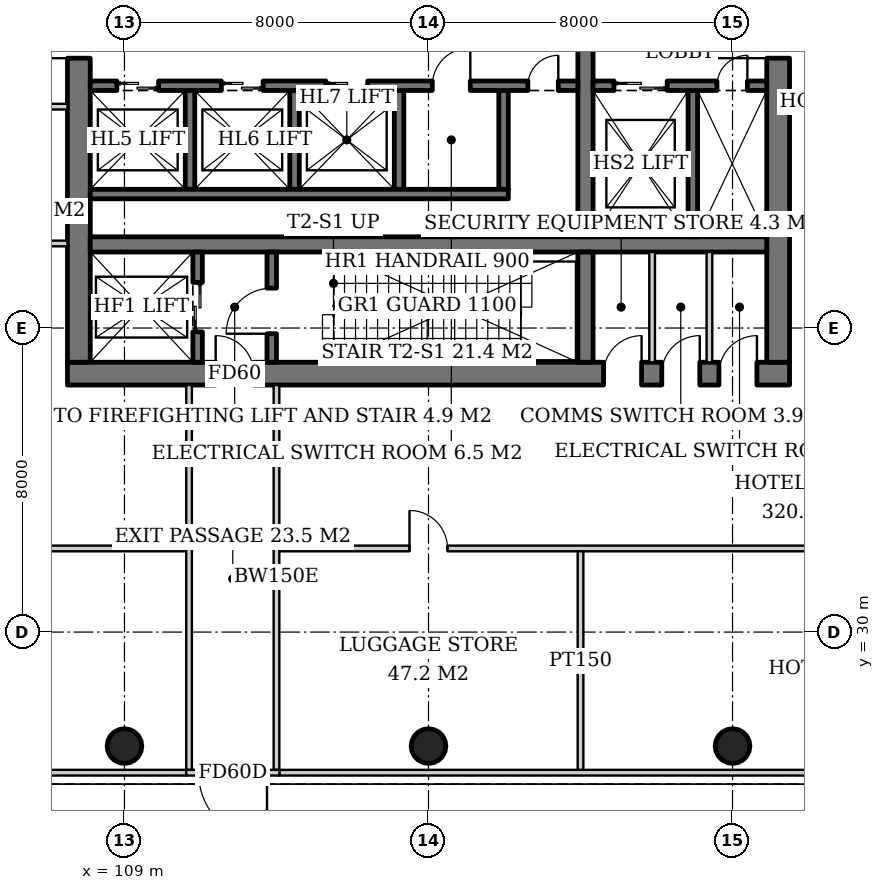
"""IFC4 building model, lengths in metres.
Left out: names, types, materials, properties, quantities, classifications, styles, units other than length and angle.
Written with IfcOpenShell. Run it as: python <this file> out.ifc"""

import sys

from ifc_helpers import new_model, si_unit, direction, frame, frame_2d, origin, origin_2d, place, context, subcontext, project, spatial, rectangle, hollow_circle, extrude, element, fill, save


model = new_model("IFC4")
c1 = context("Model", 3, precision=1e-05, world=origin(), true_north=direction((0.0, 1.0)))
c2 = subcontext(c1, "Body", "Model", "MODEL_VIEW")
j1 = project(units=[si_unit("LENGTHUNIT", "METRE"), si_unit("PLANEANGLEUNIT", "RADIAN")], contexts=[c1])
p1 = place(None, origin())
s1 = spatial("IfcSite", under=j1, at=p1, CompositionType="ELEMENT")
p2 = place(p1, origin())
s2 = spatial("IfcBuilding", under=s1, at=p2, CompositionType="ELEMENT")
p3 = place(p2, origin())
s3 = spatial("IfcBuildingStorey", under=s2, at=p3, CompositionType="ELEMENT", Elevation=0.0)
for number, where, z_axis, x_axis in (
    (1, (109.0, 27.0, 0.0), (0.0, 0.0, 1.0), (1.0, 0.0, 0.0)),
    (2, (117.0, 27.0, 0.0), (0.0, 0.0, 1.0), (1.0, 0.0, 0.0)),
    (3, (125.0, 27.0, 0.0), (0.0, 0.0, 1.0), (1.0, 0.0, 0.0)),
):
    element("IfcColumn", number, at=place(p3, frame(where, z_axis=z_axis, x_axis=x_axis)), inside=s3, PredefinedType="COLUMN", context=c2, shape_type="SweptSolid", body=[
        extrude(hollow_circle(Radius=0.457, WallThickness=0.03, at=origin_2d()), origin(), (0.0, 0.0, 1.0), 6.0),
    ])
p4 = place(p3, frame((107.5, 36.8, 0.0), z_axis=(0.0, 0.0, 1.0), x_axis=(1.0, 0.0, 0.0)))
e4 = element("IfcWall", 4, at=p4, inside=s3, PredefinedType="SHEAR", context=c2, shape_type="SweptSolid", body=[
    extrude(rectangle(XDim=19.0, YDim=0.6, at=frame_2d((9.5, 0.0))), origin(), (0.0, 0.0, 1.0), 6.0),
])
p5 = place(p4, frame((3.9, 0.0, 0.0)))
e5 = element("IfcOpeningElement", 5, at=p5, cuts=e4, PredefinedType="OPENING", context=c2, shape_type="SweptSolid", body=[
    extrude(rectangle(XDim=1.0, YDim=2.1, at=frame_2d((0.5, 1.05))), frame((0.0, 0.31, 0.0), z_axis=(0.0, -1.0, 0.0), x_axis=(1.0, 0.0, 0.0)), (0.0, 0.0, 1.0), 0.62),
])
p6 = place(p4, frame((14.107, 0.0, 0.0)))
e6 = element("IfcOpeningElement", 6, at=p6, cuts=e4, PredefinedType="OPENING", context=c2, shape_type="SweptSolid", body=[
    extrude(rectangle(XDim=1.0, YDim=2.1, at=frame_2d((0.5, 1.05))), frame((0.0, 0.31, 0.0), z_axis=(0.0, -1.0, 0.0), x_axis=(1.0, 0.0, 0.0)), (0.0, 0.0, 1.0), 0.62),
])
p7 = place(p4, frame((15.638, 0.0, 0.0)))
e7 = element("IfcOpeningElement", 7, at=p7, cuts=e4, PredefinedType="OPENING", context=c2, shape_type="SweptSolid", body=[
    extrude(rectangle(XDim=1.0, YDim=2.1, at=frame_2d((0.5, 1.05))), frame((0.0, 0.31, 0.0), z_axis=(0.0, -1.0, 0.0), x_axis=(1.0, 0.0, 0.0)), (0.0, 0.0, 1.0), 0.62),
])
p8 = place(p4, frame((17.142, 0.0, 0.0)))
e8 = element("IfcOpeningElement", 8, at=p8, cuts=e4, PredefinedType="OPENING", context=c2, shape_type="SweptSolid", body=[
    extrude(rectangle(XDim=1.0, YDim=2.1, at=frame_2d((0.5, 1.05))), frame((0.0, 0.31, 0.0), z_axis=(0.0, -1.0, 0.0), x_axis=(1.0, 0.0, 0.0)), (0.0, 0.0, 1.0), 0.62),
])
p9 = place(p3, frame((107.8, 37.1, 0.0), z_axis=(0.0, 0.0, 1.0), x_axis=(0.0, 1.0, 0.0)))
e9 = element("IfcWall", 9, at=p9, inside=s3, PredefinedType="SHEAR", context=c2, shape_type="SweptSolid", body=[
    extrude(rectangle(XDim=17.8, YDim=0.6, at=frame_2d((8.9, 0.0))), origin(), (0.0, 0.0, 1.0), 6.0),
])
p10 = place(p9, frame((8.0, 0.0, 0.0)))
e10 = element("IfcOpeningElement", 10, at=p10, cuts=e9, PredefinedType="OPENING", context=c2, shape_type="SweptSolid", body=[
    extrude(rectangle(XDim=1.8, YDim=2.4, at=frame_2d((0.9, 1.2))), frame((0.0, 0.31, 0.0), z_axis=(0.0, -1.0, 0.0), x_axis=(1.0, 0.0, 0.0)), (0.0, 0.0, 1.0), 0.62),
])
p11 = place(p3, frame((126.2, 37.1, 0.0), z_axis=(0.0, 0.0, 1.0), x_axis=(0.0, 1.0, 0.0)))
e11 = element("IfcWall", 11, at=p11, inside=s3, PredefinedType="SHEAR", context=c2, shape_type="SweptSolid", body=[
    extrude(rectangle(XDim=17.8, YDim=0.6, at=frame_2d((8.9, 0.0))), origin(), (0.0, 0.0, 1.0), 6.0),
])
p12 = place(p11, frame((8.0, 0.0, 0.0)))
e12 = element("IfcOpeningElement", 12, at=p12, cuts=e11, PredefinedType="OPENING", context=c2, shape_type="SweptSolid", body=[
    extrude(rectangle(XDim=1.8, YDim=2.4, at=frame_2d((0.9, 1.2))), frame((0.0, 0.31, 0.0), z_axis=(0.0, -1.0, 0.0), x_axis=(1.0, 0.0, 0.0)), (0.0, 0.0, 1.0), 0.62),
])
p13 = place(p3, frame((108.1, 40.2, 0.0), z_axis=(0.0, 0.0, 1.0), x_axis=(1.0, 0.0, 0.0)))
e13 = element("IfcWall", 13, at=p13, inside=s3, PredefinedType="SHEAR", context=c2, shape_type="SweptSolid", body=[
    extrude(rectangle(XDim=17.8, YDim=0.4, at=frame_2d((8.9, 0.0))), origin(), (0.0, 0.0, 1.0), 6.0),
])
p14 = place(p3, frame((121.13, 37.1, 0.0), z_axis=(0.0, 0.0, 1.0), x_axis=(0.0, 1.0, 0.0)))
e14 = element("IfcWall", 14, at=p14, inside=s3, PredefinedType="SHEAR", context=c2, shape_type="SweptSolid", body=[
    extrude(rectangle(XDim=2.9, YDim=0.4, at=frame_2d((1.45, 0.0))), origin(), (0.0, 0.0, 1.0), 6.0),
])
p15 = place(p3, frame((121.13, 40.4, 0.0), z_axis=(0.0, 0.0, 1.0), x_axis=(0.0, 1.0, 0.0)))
e15 = element("IfcWall", 15, at=p15, inside=s3, PredefinedType="SHEAR", context=c2, shape_type="SweptSolid", body=[
    extrude(rectangle(XDim=11.2, YDim=0.4, at=frame_2d((5.6, 0.0))), origin(), (0.0, 0.0, 1.0), 6.0),
])
p16 = place(p3, frame((110.925, 37.1, 0.0), z_axis=(0.0, 0.0, 1.0), x_axis=(0.0, 1.0, 0.0)))
e16 = element("IfcWall", 16, at=p16, inside=s3, PredefinedType="SHEAR", context=c2, shape_type="SweptSolid", body=[
    extrude(rectangle(XDim=2.9, YDim=0.25, at=frame_2d((1.45, 0.0))), origin(), (0.0, 0.0, 1.0), 6.0),
])
p17 = place(p16, frame((0.8, 0.0, 0.0)))
e17 = element("IfcOpeningElement", 17, at=p17, cuts=e16, PredefinedType="OPENING", context=c2, shape_type="SweptSolid", body=[
    extrude(rectangle(XDim=1.3, YDim=2.2, at=frame_2d((0.65, 1.1))), frame((0.0, 0.135, 0.0), z_axis=(0.0, -1.0, 0.0), x_axis=(1.0, 0.0, 0.0)), (0.0, 0.0, 1.0), 0.27),
])
p18 = place(p3, frame((112.875, 37.1, 0.0), z_axis=(0.0, 0.0, 1.0), x_axis=(0.0, 1.0, 0.0)))
e18 = element("IfcWall", 18, at=p18, inside=s3, PredefinedType="SHEAR", context=c2, shape_type="SweptSolid", body=[
    extrude(rectangle(XDim=2.9, YDim=0.25, at=frame_2d((1.45, 0.0))), origin(), (0.0, 0.0, 1.0), 6.0),
])
p19 = place(p18, frame((0.75, 0.0, 0.0)))
e19 = element("IfcOpeningElement", 19, at=p19, cuts=e18, PredefinedType="OPENING", context=c2, shape_type="SweptSolid", body=[
    extrude(rectangle(XDim=1.2, YDim=2.1, at=frame_2d((0.6, 1.05))), frame((0.0, 0.135, 0.0), z_axis=(0.0, -1.0, 0.0), x_axis=(1.0, 0.0, 0.0)), (0.0, 0.0, 1.0), 0.27),
])
for number, where, z_axis, x_axis in (
    (20, (110.725, 44.25, 0.0), (0.0, 0.0, 1.0), (0.0, -1.0, 0.0)),
    (21, (113.475, 44.25, 0.0), (0.0, 0.0, 1.0), (0.0, -1.0, 0.0)),
    (22, (116.225, 44.25, 0.0), (0.0, 0.0, 1.0), (0.0, -1.0, 0.0)),
    (23, (118.975, 44.25, 0.0), (0.0, 0.0, 1.0), (0.0, -1.0, 0.0)),
):
    element("IfcWall", number, at=place(p3, frame(where, z_axis=z_axis, x_axis=x_axis)), inside=s3, PredefinedType="SHEAR", context=c2, shape_type="SweptSolid", body=[
        extrude(rectangle(XDim=2.6, YDim=0.25, at=frame_2d((1.3, 0.0))), origin(), (0.0, 0.0, 1.0), 6.0),
    ])
p20 = place(p3, frame((108.1, 41.525, 0.0), z_axis=(0.0, 0.0, 1.0), x_axis=(1.0, 0.0, 0.0)))
e24 = element("IfcWall", 24, at=p20, inside=s3, PredefinedType="SHEAR", context=c2, shape_type="SweptSolid", body=[
    extrude(rectangle(XDim=11.0, YDim=0.25, at=frame_2d((5.5, 0.0))), origin(), (0.0, 0.0, 1.0), 6.0),
])
p21 = place(p3, frame((108.1, 44.375, 0.0), z_axis=(0.0, 0.0, 1.0), x_axis=(1.0, 0.0, 0.0)))
e25 = element("IfcWall", 25, at=p21, inside=s3, PredefinedType="SHEAR", context=c2, shape_type="SweptSolid", body=[
    extrude(rectangle(XDim=12.83, YDim=0.25, at=frame_2d((6.415, 0.0))), origin(), (0.0, 0.0, 1.0), 6.0),
])
p22 = place(p21, frame((0.7, 0.0, 0.0)))
e26 = element("IfcOpeningElement", 26, at=p22, cuts=e25, PredefinedType="OPENING", context=c2, shape_type="SweptSolid", body=[
    extrude(rectangle(XDim=1.1, YDim=2.2, at=frame_2d((0.55, 1.1))), frame((0.0, 0.135, 0.0), z_axis=(0.0, -1.0, 0.0), x_axis=(1.0, 0.0, 0.0)), (0.0, 0.0, 1.0), 0.27),
])
p23 = place(p21, frame((3.45, 0.0, 0.0)))
e27 = element("IfcOpeningElement", 27, at=p23, cuts=e25, PredefinedType="OPENING", context=c2, shape_type="SweptSolid", body=[
    extrude(rectangle(XDim=1.1, YDim=2.2, at=frame_2d((0.55, 1.1))), frame((0.0, 0.135, 0.0), z_axis=(0.0, -1.0, 0.0), x_axis=(1.0, 0.0, 0.0)), (0.0, 0.0, 1.0), 0.27),
])
p24 = place(p21, frame((6.2, 0.0, 0.0)))
e28 = element("IfcOpeningElement", 28, at=p24, cuts=e25, PredefinedType="OPENING", context=c2, shape_type="SweptSolid", body=[
    extrude(rectangle(XDim=1.1, YDim=2.2, at=frame_2d((0.55, 1.1))), frame((0.0, 0.135, 0.0), z_axis=(0.0, -1.0, 0.0), x_axis=(1.0, 0.0, 0.0)), (0.0, 0.0, 1.0), 0.27),
])
p25 = place(p21, frame((9.0, 0.0, 0.0)))
e29 = element("IfcOpeningElement", 29, at=p25, cuts=e25, PredefinedType="OPENING", context=c2, shape_type="SweptSolid", body=[
    extrude(rectangle(XDim=1.0, YDim=2.1, at=frame_2d((0.5, 1.05))), frame((0.0, 0.135, 0.0), z_axis=(0.0, -1.0, 0.0), x_axis=(1.0, 0.0, 0.0)), (0.0, 0.0, 1.0), 0.27),
])
p26 = place(p21, frame((11.515, 0.0, 0.0)))
e30 = element("IfcOpeningElement", 30, at=p26, cuts=e25, PredefinedType="OPENING", context=c2, shape_type="SweptSolid", body=[
    extrude(rectangle(XDim=0.8, YDim=2.0, at=frame_2d((0.4, 1.0))), frame((0.0, 0.135, 0.0), z_axis=(0.0, -1.0, 0.0), x_axis=(1.0, 0.0, 0.0)), (0.0, 0.0, 1.0), 0.27),
])
p27 = place(p3, frame((123.955, 44.25, 0.0), z_axis=(0.0, 0.0, 1.0), x_axis=(0.0, -1.0, 0.0)))
e31 = element("IfcWall", 31, at=p27, inside=s3, PredefinedType="SHEAR", context=c2, shape_type="SweptSolid", body=[
    extrude(rectangle(XDim=3.85, YDim=0.25, at=frame_2d((1.925, 0.0))), origin(), (0.0, 0.0, 1.0), 6.0),
])
p28 = place(p3, frame((121.33, 44.375, 0.0), z_axis=(0.0, 0.0, 1.0), x_axis=(1.0, 0.0, 0.0)))
e32 = element("IfcWall", 32, at=p28, inside=s3, PredefinedType="SHEAR", context=c2, shape_type="SweptSolid", body=[
    extrude(rectangle(XDim=4.57, YDim=0.25, at=frame_2d((2.285, 0.0))), origin(), (0.0, 0.0, 1.0), 6.0),
])
p29 = place(p28, frame((0.55, 0.0, 0.0)))
e33 = element("IfcOpeningElement", 33, at=p29, cuts=e32, PredefinedType="OPENING", context=c2, shape_type="SweptSolid", body=[
    extrude(rectangle(XDim=1.4, YDim=2.4, at=frame_2d((0.7, 1.2))), frame((0.0, 0.135, 0.0), z_axis=(0.0, -1.0, 0.0), x_axis=(1.0, 0.0, 0.0)), (0.0, 0.0, 1.0), 0.27),
])
p30 = place(p28, frame((3.26, 0.0, 0.0)))
e34 = element("IfcOpeningElement", 34, at=p30, cuts=e32, PredefinedType="OPENING", context=c2, shape_type="SweptSolid", body=[
    extrude(rectangle(XDim=0.8, YDim=2.0, at=frame_2d((0.4, 1.0))), frame((0.0, 0.135, 0.0), z_axis=(0.0, -1.0, 0.0), x_axis=(1.0, 0.0, 0.0)), (0.0, 0.0, 1.0), 0.27),
])
for number, where, z_axis, x_axis in (
    (35, (122.884, 37.1, 0.0), (0.0, 0.0, 1.0), (0.0, 1.0, 0.0)),
    (36, (124.392, 37.1, 0.0), (0.0, 0.0, 1.0), (0.0, 1.0, 0.0)),
):
    element("IfcWall", number, at=place(p3, frame(where, z_axis=z_axis, x_axis=x_axis)), inside=s3, PredefinedType="SOLIDWALL", context=c2, shape_type="SweptSolid", body=[
        extrude(rectangle(XDim=2.9, YDim=0.15, at=frame_2d((1.45, 0.0))), origin(), (0.0, 0.0, 1.0), 5.7),
    ])
for number, where, z_axis, x_axis in (
    (37, (104.975, 43.825, 0.0), (0.0, 0.0, 1.0), (1.0, 0.0, 0.0)),
    (38, (104.975, 40.225, 0.0), (0.0, 0.0, 1.0), (1.0, 0.0, 0.0)),
):
    element("IfcWall", number, at=place(p3, frame(where, z_axis=z_axis, x_axis=x_axis)), inside=s3, PredefinedType="PARTITIONING", context=c2, shape_type="SweptSolid", body=[
        extrude(rectangle(XDim=2.525, YDim=0.15, at=frame_2d((1.262, 0.0))), origin(), (0.0, 0.0, 1.0), 5.7),
    ])
p31 = place(p3, frame((97.225, 26.3, 0.0), z_axis=(0.0, 0.0, 1.0), x_axis=(1.0, 0.0, 0.0)))
e39 = element("IfcWall", 39, at=p31, inside=s3, PredefinedType="PARTITIONING", context=c2, shape_type="SweptSolid", body=[
    extrude(rectangle(XDim=13.4, YDim=0.15, at=frame_2d((6.7, 0.0))), origin(), (0.0, 0.0, 1.0), 5.7),
])
p32 = place(p3, frame((113.075, 26.3, 0.0), z_axis=(0.0, 0.0, 1.0), x_axis=(1.0, 0.0, 0.0)))
e40 = element("IfcWall", 40, at=p32, inside=s3, PredefinedType="PARTITIONING", context=c2, shape_type="SweptSolid", body=[
    extrude(rectangle(XDim=23.7, YDim=0.15, at=frame_2d((11.85, 0.0))), origin(), (0.0, 0.0, 1.0), 5.7),
])
p33 = place(p3, frame((97.225, 32.2, 0.0), z_axis=(0.0, 0.0, 1.0), x_axis=(1.0, 0.0, 0.0)))
e41 = element("IfcWall", 41, at=p33, inside=s3, PredefinedType="PARTITIONING", context=c2, shape_type="SweptSolid", body=[
    extrude(rectangle(XDim=13.4, YDim=0.15, at=frame_2d((6.7, 0.0))), origin(), (0.0, 0.0, 1.0), 4.9),
])
p34 = place(p33, frame((7.425, 0.0, 0.0)))
e42 = element("IfcOpeningElement", 42, at=p34, cuts=e41, PredefinedType="OPENING", context=c2, shape_type="SweptSolid", body=[
    extrude(rectangle(XDim=1.0, YDim=2.1, at=frame_2d((0.5, 1.05))), frame((0.0, 0.085, 0.0), z_axis=(0.0, -1.0, 0.0), x_axis=(1.0, 0.0, 0.0)), (0.0, 0.0, 1.0), 0.17),
])
p35 = place(p3, frame((113.075, 32.2, 0.0), z_axis=(0.0, 0.0, 1.0), x_axis=(1.0, 0.0, 0.0)))
e43 = element("IfcWall", 43, at=p35, inside=s3, PredefinedType="PARTITIONING", context=c2, shape_type="SweptSolid", body=[
    extrude(rectangle(XDim=23.7, YDim=0.15, at=frame_2d((11.85, 0.0))), origin(), (0.0, 0.0, 1.0), 4.947),
])
p36 = place(p35, frame((3.425, 0.0, 0.0)))
e44 = element("IfcOpeningElement", 44, at=p36, cuts=e43, PredefinedType="OPENING", context=c2, shape_type="SweptSolid", body=[
    extrude(rectangle(XDim=1.0, YDim=2.1, at=frame_2d((0.5, 1.05))), frame((0.0, 0.085, 0.0), z_axis=(0.0, -1.0, 0.0), x_axis=(1.0, 0.0, 0.0)), (0.0, 0.0, 1.0), 0.17),
])
p37 = place(p35, frame((15.275, 0.0, 0.0)))
e45 = element("IfcOpeningElement", 45, at=p37, cuts=e43, PredefinedType="OPENING", context=c2, shape_type="SweptSolid", body=[
    extrude(rectangle(XDim=1.0, YDim=2.1, at=frame_2d((0.5, 1.05))), frame((0.0, 0.085, 0.0), z_axis=(0.0, -1.0, 0.0), x_axis=(1.0, 0.0, 0.0)), (0.0, 0.0, 1.0), 0.17),
])
p38 = place(p3, frame((121.0, 26.375, 0.0), z_axis=(0.0, 0.0, 1.0), x_axis=(0.0, 1.0, 0.0)))
e46 = element("IfcWall", 46, at=p38, inside=s3, PredefinedType="PARTITIONING", context=c2, shape_type="SweptSolid", body=[
    extrude(rectangle(XDim=5.75, YDim=0.15, at=frame_2d((2.875, 0.0))), origin(), (0.0, 0.0, 1.0), 5.15),
])
for number, where, z_axis, x_axis in (
    (47, (110.7, 26.375, 0.0), (0.0, 0.0, 1.0), (0.0, 1.0, 0.0)),
    (48, (113.0, 26.375, 0.0), (0.0, 0.0, 1.0), (0.0, 1.0, 0.0)),
):
    element("IfcWall", number, at=place(p3, frame(where, z_axis=z_axis, x_axis=x_axis)), inside=s3, PredefinedType="SOLIDWALL", context=c2, shape_type="SweptSolid", body=[
        extrude(rectangle(XDim=10.125, YDim=0.15, at=frame_2d((5.062, 0.0))), origin(), (0.0, 0.0, 1.0), 5.15),
    ])
p39 = place(p3, frame((113.075, 26.3, 0.0), z_axis=(0.0, 0.0, 1.0), x_axis=(-1.0, 0.0, 0.0)))
e49 = element("IfcWall", 49, at=p39, inside=s3, PredefinedType="SOLIDWALL", context=c2, shape_type="SweptSolid", body=[
    extrude(rectangle(XDim=2.45, YDim=0.15, at=frame_2d((1.225, 0.0))), origin(), (0.0, 0.0, 1.0), 5.7),
])
p40 = place(p39, frame((0.325, 0.0, 0.0)))
e50 = element("IfcOpeningElement", 50, at=p40, cuts=e49, PredefinedType="OPENING", context=c2, shape_type="SweptSolid", body=[
    extrude(rectangle(XDim=1.8, YDim=2.4, at=frame_2d((0.9, 1.2))), frame((0.0, 0.085, 0.0), z_axis=(0.0, -1.0, 0.0), x_axis=(1.0, 0.0, 0.0)), (0.0, 0.0, 1.0), 0.17),
])
p41 = place(p17, origin())
e51 = element("IfcDoor", 51, at=p41, inside=s3, OperationType="DOUBLE_DOOR_SLIDING", PredefinedType="DOOR", context=c2, shape_type="SweptSolid", body=[
    extrude(rectangle(XDim=1.3, YDim=2.2, at=frame_2d((0.65, 1.1))), frame((0.0, 0.025, 0.0), z_axis=(0.0, -1.0, 0.0), x_axis=(1.0, 0.0, 0.0)), (0.0, 0.0, 1.0), 0.05),
])
fill(e17, e51)
p42 = place(p19, origin())
e52 = element("IfcDoor", 52, at=p42, inside=s3, OperationType="SINGLE_SWING_LEFT", PredefinedType="DOOR", context=c2, shape_type="SweptSolid", body=[
    extrude(rectangle(XDim=1.2, YDim=2.1, at=frame_2d((0.6, 1.05))), frame((0.0, 0.025, 0.0), z_axis=(0.0, -1.0, 0.0), x_axis=(1.0, 0.0, 0.0)), (0.0, 0.0, 1.0), 0.05),
])
fill(e19, e52)
p43 = place(p22, origin())
e53 = element("IfcDoor", 53, at=p43, inside=s3, OperationType="DOUBLE_DOOR_SLIDING", PredefinedType="DOOR", context=c2, shape_type="SweptSolid", body=[
    extrude(rectangle(XDim=1.1, YDim=2.2, at=frame_2d((0.55, 1.1))), frame((0.0, 0.025, 0.0), z_axis=(0.0, -1.0, 0.0), x_axis=(1.0, 0.0, 0.0)), (0.0, 0.0, 1.0), 0.05),
])
fill(e26, e53)
p44 = place(p23, origin())
e54 = element("IfcDoor", 54, at=p44, inside=s3, OperationType="DOUBLE_DOOR_SLIDING", PredefinedType="DOOR", context=c2, shape_type="SweptSolid", body=[
    extrude(rectangle(XDim=1.1, YDim=2.2, at=frame_2d((0.55, 1.1))), frame((0.0, 0.025, 0.0), z_axis=(0.0, -1.0, 0.0), x_axis=(1.0, 0.0, 0.0)), (0.0, 0.0, 1.0), 0.05),
])
fill(e27, e54)
p45 = place(p24, origin())
e55 = element("IfcDoor", 55, at=p45, inside=s3, OperationType="DOUBLE_DOOR_SLIDING", PredefinedType="DOOR", context=c2, shape_type="SweptSolid", body=[
    extrude(rectangle(XDim=1.1, YDim=2.2, at=frame_2d((0.55, 1.1))), frame((0.0, 0.025, 0.0), z_axis=(0.0, -1.0, 0.0), x_axis=(1.0, 0.0, 0.0)), (0.0, 0.0, 1.0), 0.05),
])
fill(e28, e55)
p46 = place(p25, origin())
e56 = element("IfcDoor", 56, at=p46, inside=s3, OperationType="SINGLE_SWING_RIGHT", PredefinedType="DOOR", context=c2, shape_type="SweptSolid", body=[
    extrude(rectangle(XDim=1.0, YDim=2.1, at=frame_2d((0.5, 1.05))), frame((0.0, 0.025, 0.0), z_axis=(0.0, -1.0, 0.0), x_axis=(1.0, 0.0, 0.0)), (0.0, 0.0, 1.0), 0.05),
])
fill(e29, e56)
p47 = place(p26, origin())
e57 = element("IfcDoor", 57, at=p47, inside=s3, OperationType="SINGLE_SWING_RIGHT", PredefinedType="DOOR", context=c2, shape_type="SweptSolid", body=[
    extrude(rectangle(XDim=0.8, YDim=2.0, at=frame_2d((0.4, 1.0))), frame((0.0, 0.025, 0.0), z_axis=(0.0, -1.0, 0.0), x_axis=(1.0, 0.0, 0.0)), (0.0, 0.0, 1.0), 0.05),
])
fill(e30, e57)
p48 = place(p29, origin())
e58 = element("IfcDoor", 58, at=p48, inside=s3, OperationType="DOUBLE_DOOR_SLIDING", PredefinedType="DOOR", context=c2, shape_type="SweptSolid", body=[
    extrude(rectangle(XDim=1.4, YDim=2.4, at=frame_2d((0.7, 1.2))), frame((0.0, 0.025, 0.0), z_axis=(0.0, -1.0, 0.0), x_axis=(1.0, 0.0, 0.0)), (0.0, 0.0, 1.0), 0.05),
])
fill(e33, e58)
p49 = place(p30, origin())
e59 = element("IfcDoor", 59, at=p49, inside=s3, OperationType="SINGLE_SWING_RIGHT", PredefinedType="DOOR", context=c2, shape_type="SweptSolid", body=[
    extrude(rectangle(XDim=0.8, YDim=2.0, at=frame_2d((0.4, 1.0))), frame((0.0, 0.025, 0.0), z_axis=(0.0, -1.0, 0.0), x_axis=(1.0, 0.0, 0.0)), (0.0, 0.0, 1.0), 0.05),
])
fill(e34, e59)
p50 = place(p5, origin())
e60 = element("IfcDoor", 60, at=p50, inside=s3, OperationType="SINGLE_SWING_LEFT", PredefinedType="DOOR", context=c2, shape_type="SweptSolid", body=[
    extrude(rectangle(XDim=1.0, YDim=2.1, at=frame_2d((0.5, 1.05))), frame((0.0, 0.025, 0.0), z_axis=(0.0, -1.0, 0.0), x_axis=(1.0, 0.0, 0.0)), (0.0, 0.0, 1.0), 0.05),
])
fill(e5, e60)
p51 = place(p10, origin())
e61 = element("IfcDoor", 61, at=p51, inside=s3, OperationType="DOUBLE_DOOR_SINGLE_SWING", PredefinedType="DOOR", context=c2, shape_type="SweptSolid", body=[
    extrude(rectangle(XDim=1.8, YDim=2.4, at=frame_2d((0.9, 1.2))), frame((0.0, 0.025, 0.0), z_axis=(0.0, -1.0, 0.0), x_axis=(1.0, 0.0, 0.0)), (0.0, 0.0, 1.0), 0.05),
])
fill(e10, e61)
p52 = place(p12, origin())
e62 = element("IfcDoor", 62, at=p52, inside=s3, OperationType="DOUBLE_DOOR_SINGLE_SWING", PredefinedType="DOOR", context=c2, shape_type="SweptSolid", body=[
    extrude(rectangle(XDim=1.8, YDim=2.4, at=frame_2d((0.9, 1.2))), frame((0.0, 0.025, 0.0), z_axis=(0.0, -1.0, 0.0), x_axis=(1.0, 0.0, 0.0)), (0.0, 0.0, 1.0), 0.05),
])
fill(e12, e62)
p53 = place(p6, origin())
e63 = element("IfcDoor", 63, at=p53, inside=s3, OperationType="SINGLE_SWING_RIGHT", PredefinedType="DOOR", context=c2, shape_type="SweptSolid", body=[
    extrude(rectangle(XDim=1.0, YDim=2.1, at=frame_2d((0.5, 1.05))), frame((0.0, 0.29, 0.0), z_axis=(0.0, -1.0, 0.0), x_axis=(1.0, 0.0, 0.0)), (0.0, 0.0, 1.0), 0.05),
])
fill(e6, e63)
p54 = place(p7, origin())
e64 = element("IfcDoor", 64, at=p54, inside=s3, OperationType="SINGLE_SWING_RIGHT", PredefinedType="DOOR", context=c2, shape_type="SweptSolid", body=[
    extrude(rectangle(XDim=1.0, YDim=2.1, at=frame_2d((0.5, 1.05))), frame((0.0, 0.29, 0.0), z_axis=(0.0, -1.0, 0.0), x_axis=(1.0, 0.0, 0.0)), (0.0, 0.0, 1.0), 0.05),
])
fill(e7, e64)
p55 = place(p8, origin())
e65 = element("IfcDoor", 65, at=p55, inside=s3, OperationType="SINGLE_SWING_RIGHT", PredefinedType="DOOR", context=c2, shape_type="SweptSolid", body=[
    extrude(rectangle(XDim=1.0, YDim=2.1, at=frame_2d((0.5, 1.05))), frame((0.0, 0.29, 0.0), z_axis=(0.0, -1.0, 0.0), x_axis=(1.0, 0.0, 0.0)), (0.0, 0.0, 1.0), 0.05),
])
fill(e8, e65)
p56 = place(p36, origin())
e66 = element("IfcDoor", 66, at=p56, inside=s3, OperationType="SINGLE_SWING_LEFT", PredefinedType="DOOR", context=c2, shape_type="SweptSolid", body=[
    extrude(rectangle(XDim=1.0, YDim=2.1, at=frame_2d((0.5, 1.05))), frame((0.0, 0.025, 0.0), z_axis=(0.0, -1.0, 0.0), x_axis=(1.0, 0.0, 0.0)), (0.0, 0.0, 1.0), 0.05),
])
fill(e44, e66)
p57 = place(p40, origin())
e67 = element("IfcDoor", 67, at=p57, inside=s3, OperationType="DOUBLE_DOOR_SINGLE_SWING", PredefinedType="DOOR", context=c2, shape_type="SweptSolid", body=[
    extrude(rectangle(XDim=1.8, YDim=2.4, at=frame_2d((0.9, 1.2))), frame((0.0, 0.025, 0.0), z_axis=(0.0, -1.0, 0.0), x_axis=(1.0, 0.0, 0.0)), (0.0, 0.0, 1.0), 0.05),
])
fill(e50, e67)
save(model, sys.argv[1])
